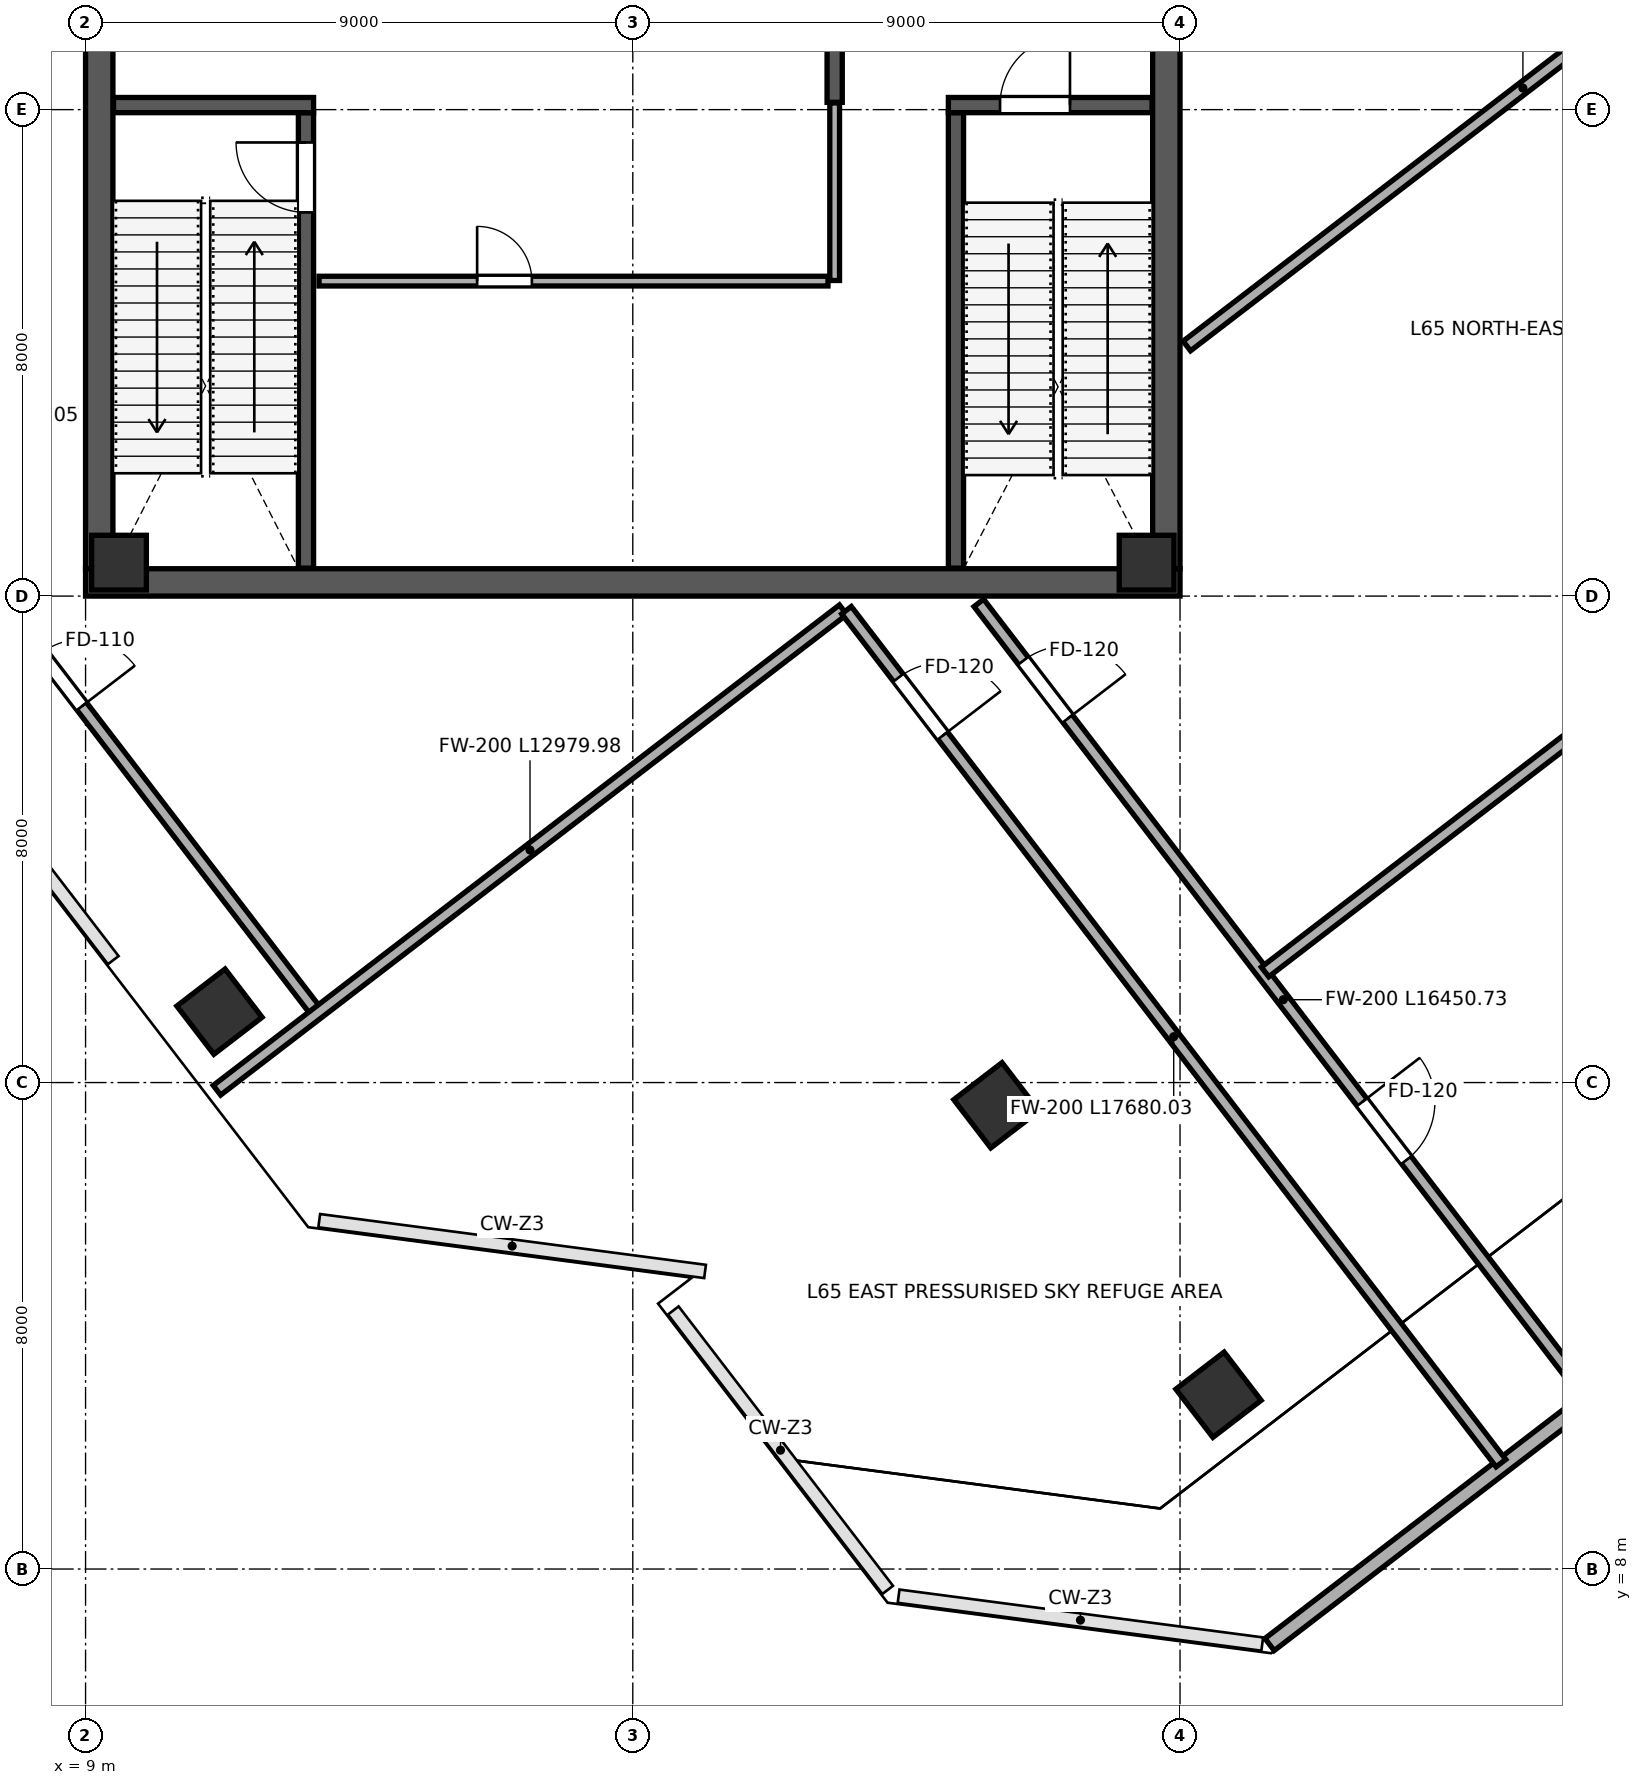
"""IFC4 building model, lengths in metres.
Left out: names, types, materials, properties, quantities, classifications, styles, units other than length and angle.
Written with IfcOpenShell. Run it as: python <this file> out.ifc"""

import sys

from ifc_helpers import new_model, si_unit, direction, frame, frame_2d, origin, origin_2d, place, context, subcontext, project, spatial, rectangle, extrude, clip, halfspace, source, transform, mapped, element, fill, save


model = new_model("IFC4")
c1 = context("Model", 3, precision=1e-05, world=origin(), true_north=direction((0.0, 1.0)))
c2 = subcontext(c1, "Body", "Model", "MODEL_VIEW")
j1 = project(units=[si_unit("LENGTHUNIT", "METRE"), si_unit("PLANEANGLEUNIT", "RADIAN")], contexts=[c1])
p1 = place(None, origin())
s1 = spatial("IfcSite", under=j1, at=p1, CompositionType="ELEMENT")
p2 = place(p1, origin())
s2 = spatial("IfcBuilding", under=s1, at=p2, CompositionType="ELEMENT")
p3 = place(p2, frame((0.0, 0.0, 287.8)))
s3 = spatial("IfcBuildingStorey", under=s2, at=p3, CompositionType="ELEMENT", Elevation=287.8)
m1 = source(origin(), c2, "Body", "SweptSolid", [
    extrude(rectangle(XDim=0.9, YDim=0.9, at=origin_2d()), origin(), (0.0, 0.0, 1.0), 5.999),
])
for number, where, z_axis, x_axis in (
    (1, (9.55, 24.55, 0.001), (0.0, 0.0, 1.0), (1.0, 0.0, 0.0)),
    (2, (26.45, 24.55, 0.001), (0.0, 0.0, 1.0), (1.0, 0.0, 0.0)),
):
    element("IfcColumn", number, at=place(p3, frame(where, z_axis=z_axis, x_axis=x_axis)), inside=s3, PredefinedType="COLUMN", context=c2, shape_type="MappedRepresentation", body=[
        mapped(m1, transform((0.0, 0.0, 0.0), scale=1.0)),
    ])
p4 = place(p3, frame((11.202, 17.166, 0.0), z_axis=(-0.105297550082, 0.076532357281, 0.991491414101), x_axis=(0.994201661281, 0.029964203351, 0.103272470792)))
e3 = element("IfcColumn", 3, at=p4, inside=s3, PredefinedType="COLUMN", context=c2, shape_type="Clipping", body=[
    clip(clip(extrude(rectangle(XDim=1.0, YDim=1.0, at=origin_2d()), origin(), (0.0, 0.0, 1.0), 6.052), halfspace(frame((0.0, 0.0, 0.093), z_axis=(0.0, 0.0, -1.0), x_axis=(1.0, 0.0, 0.0)), False)), halfspace(frame((0.0, 0.0, 5.959), z_axis=(0.0, 0.0, 1.0), x_axis=(1.0, 0.0, 0.0)), False)),
])
p5 = place(p3, frame((23.98, 15.626, 0.0), z_axis=(-0.118568909367, -0.015310942641, 0.99282777397), x_axis=(0.703214390485, 0.704622852055, 0.094848075236)))
e4 = element("IfcColumn", 4, at=p5, inside=s3, PredefinedType="COLUMN", context=c2, shape_type="Clipping", body=[
    clip(clip(extrude(rectangle(XDim=1.0, YDim=1.0, at=origin_2d()), origin(), (0.0, 0.0, 1.0), 6.043), halfspace(frame((0.0, 0.0, 0.085), z_axis=(0.0, 0.0, -1.0), x_axis=(1.0, 0.0, 0.0)), False)), halfspace(frame((0.0, 0.0, 5.958), z_axis=(0.0, 0.0, 1.0), x_axis=(1.0, 0.0, 0.0)), False)),
])
m2 = source(origin(), c2, "Body", "SweptSolid", [
    extrude(rectangle(XDim=1.0, YDim=1.0, at=origin_2d()), origin(), (0.0, 0.0, 1.0), 5.799),
])
p6 = place(p3, frame((27.633, 10.866, 0.001), z_axis=(0.0, 0.0, 1.0), x_axis=(-0.608761429009, 0.793353340291, 0.0)))
e5 = element("IfcColumn", 5, at=p6, inside=s3, PredefinedType="COLUMN", context=c2, shape_type="MappedRepresentation", body=[
    mapped(m2, transform((0.0, 0.0, 0.0), scale=1.0)),
])
p7 = place(p3, frame((28.473, 6.759, 0.0), z_axis=(0.0, 0.0, 1.0), x_axis=(0.793348027375, 0.608768352873, 0.0)))
e6 = element("IfcWall", 6, at=p7, inside=s3, PredefinedType="SOLIDWALL", context=c2, shape_type="SweptSolid", body=[
    extrude(rectangle(XDim=21.469, YDim=0.25, at=frame_2d((10.734, 0.0))), origin(), (0.0, 0.0, 1.0), 5.72),
])
p8 = place(p3, frame((9.225, 24.45, 0.0), z_axis=(0.0, 0.0, 1.0), x_axis=(0.0, 1.0, 0.0)))
e7 = element("IfcWall", 7, at=p8, inside=s3, PredefinedType="SHEAR", context=c2, shape_type="SweptSolid", body=[
    extrude(rectangle(XDim=15.1, YDim=0.45, at=frame_2d((7.55, 0.0))), origin(), (0.0, 0.0, 1.0), 5.72),
])
p9 = place(p8, frame((8.7, 0.0, 0.0)))
e8 = element("IfcOpeningElement", 8, at=p9, cuts=e7, PredefinedType="OPENING", context=c2, shape_type="SweptSolid", body=[
    extrude(rectangle(XDim=1.15, YDim=2.2, at=frame_2d((0.575, 1.1))), frame((0.0, 0.235, 0.0), z_axis=(0.0, -1.0, 0.0), x_axis=(1.0, 0.0, 0.0)), (0.0, 0.0, 1.0), 0.47),
])
p10 = place(p3, frame((26.775, 24.45, 0.0), z_axis=(0.0, 0.0, 1.0), x_axis=(0.0, 1.0, 0.0)))
e9 = element("IfcWall", 9, at=p10, inside=s3, PredefinedType="SHEAR", context=c2, shape_type="SweptSolid", body=[
    extrude(rectangle(XDim=15.1, YDim=0.45, at=frame_2d((7.55, 0.0))), origin(), (0.0, 0.0, 1.0), 5.72),
])
p11 = place(p10, frame((8.6, 0.0, 0.0)))
e10 = element("IfcOpeningElement", 10, at=p11, cuts=e9, PredefinedType="OPENING", context=c2, shape_type="SweptSolid", body=[
    extrude(rectangle(XDim=1.15, YDim=2.2, at=frame_2d((0.575, 1.1))), frame((0.0, 0.235, 0.0), z_axis=(0.0, -1.0, 0.0), x_axis=(1.0, 0.0, 0.0)), (0.0, 0.0, 1.0), 0.47),
])
p12 = place(p3, frame((9.0, 24.225, 0.0), z_axis=(0.0, 0.0, 1.0), x_axis=(1.0, 0.0, 0.0)))
e11 = element("IfcWall", 11, at=p12, inside=s3, PredefinedType="SHEAR", context=c2, shape_type="SweptSolid", body=[
    extrude(rectangle(XDim=18.0, YDim=0.45, at=frame_2d((9.0, 0.0))), origin(), (0.0, 0.0, 1.0), 5.72),
])
p13 = place(p3, frame((12.625, 24.46, 0.0), z_axis=(0.0, 0.0, 1.0), x_axis=(0.0, 1.0, 0.0)))
e12 = element("IfcWall", 12, at=p13, inside=s3, PredefinedType="SHEAR", context=c2, shape_type="SweptSolid", body=[
    extrude(rectangle(XDim=7.49, YDim=0.25, at=frame_2d((3.745, 0.0))), origin(), (0.0, 0.0, 1.0), 5.72),
])
p14 = place(p13, frame((5.85, 0.0, 0.0)))
e13 = element("IfcOpeningElement", 13, at=p14, cuts=e12, PredefinedType="OPENING", context=c2, shape_type="SweptSolid", body=[
    extrude(rectangle(XDim=1.15, YDim=2.2, at=frame_2d((0.575, 1.1))), frame((0.0, 0.135, 0.0), z_axis=(0.0, -1.0, 0.0), x_axis=(1.0, 0.0, 0.0)), (0.0, 0.0, 1.0), 0.27),
])
p15 = place(p3, frame((9.46, 32.075, 0.0), z_axis=(0.0, 0.0, 1.0), x_axis=(1.0, 0.0, 0.0)))
e14 = element("IfcWall", 14, at=p15, inside=s3, PredefinedType="SHEAR", context=c2, shape_type="SweptSolid", body=[
    extrude(rectangle(XDim=3.29, YDim=0.25, at=frame_2d((1.645, 0.0))), origin(), (0.0, 0.0, 1.0), 5.72),
])
p16 = place(p3, frame((23.315, 24.46, 0.0), z_axis=(0.0, 0.0, 1.0), x_axis=(0.0, 1.0, 0.0)))
e15 = element("IfcWall", 15, at=p16, inside=s3, PredefinedType="SHEAR", context=c2, shape_type="SweptSolid", body=[
    extrude(rectangle(XDim=7.49, YDim=0.25, at=frame_2d((3.745, 0.0))), origin(), (0.0, 0.0, 1.0), 5.72),
])
p17 = place(p3, frame((23.19, 32.075, 0.0), z_axis=(0.0, 0.0, 1.0), x_axis=(1.0, 0.0, 0.0)))
e16 = element("IfcWall", 16, at=p17, inside=s3, PredefinedType="SHEAR", context=c2, shape_type="SweptSolid", body=[
    extrude(rectangle(XDim=3.35, YDim=0.25, at=frame_2d((1.675, 0.0))), origin(), (0.0, 0.0, 1.0), 5.72),
])
p18 = place(p17, frame((0.85, 0.0, 0.0)))
e17 = element("IfcOpeningElement", 17, at=p18, cuts=e16, PredefinedType="OPENING", context=c2, shape_type="SweptSolid", body=[
    extrude(rectangle(XDim=1.15, YDim=2.2, at=frame_2d((0.575, 1.1))), frame((0.0, 0.135, 0.0), z_axis=(0.0, -1.0, 0.0), x_axis=(1.0, 0.0, 0.0)), (0.0, 0.0, 1.0), 0.27),
])
p19 = place(p3, frame((21.32, 32.12, 0.0), z_axis=(0.0, 0.0, 1.0), x_axis=(0.0, 1.0, 0.0)))
e18 = element("IfcWall", 18, at=p19, inside=s3, PredefinedType="SHEAR", context=c2, shape_type="SweptSolid", body=[
    extrude(rectangle(XDim=7.42, YDim=0.25, at=frame_2d((3.71, 0.0))), origin(), (0.0, 0.0, 1.0), 5.72),
])
p20 = place(p19, frame((1.4, 0.0, 0.0)))
e19 = element("IfcOpeningElement", 19, at=p20, cuts=e18, PredefinedType="OPENING", context=c2, shape_type="SweptSolid", body=[
    extrude(rectangle(XDim=1.15, YDim=2.2, at=frame_2d((0.575, 1.1))), frame((0.0, 0.135, 0.0), z_axis=(0.0, -1.0, 0.0), x_axis=(1.0, 0.0, 0.0)), (0.0, 0.0, 1.0), 0.27),
])
p21 = place(p3, frame((12.84, 29.18, 0.0), z_axis=(0.0, 0.0, 1.0), x_axis=(1.0, 0.0, 0.0)))
e20 = element("IfcWall", 20, at=p21, inside=s3, PredefinedType="PARTITIONING", context=c2, shape_type="SweptSolid", body=[
    extrude(rectangle(XDim=8.37, YDim=0.16, at=frame_2d((4.185, 0.0))), origin(), (0.0, 0.0, 1.0), 5.72),
])
p22 = place(p21, frame((2.6, 0.0, 0.0)))
e21 = element("IfcOpeningElement", 21, at=p22, cuts=e20, PredefinedType="OPENING", context=c2, shape_type="SweptSolid", body=[
    extrude(rectangle(XDim=0.9, YDim=2.15, at=frame_2d((0.45, 1.075))), frame((0.0, 0.09, 0.0), z_axis=(0.0, -1.0, 0.0), x_axis=(1.0, 0.0, 0.0)), (0.0, 0.0, 1.0), 0.18),
])
p23 = place(p3, frame((21.32, 29.19, 0.0), z_axis=(0.0, 0.0, 1.0), x_axis=(0.0, 1.0, 0.0)))
e22 = element("IfcWall", 22, at=p23, inside=s3, PredefinedType="PARTITIONING", context=c2, shape_type="SweptSolid", body=[
    extrude(rectangle(XDim=2.92, YDim=0.16, at=frame_2d((1.46, 0.0))), origin(), (0.0, 0.0, 1.0), 5.72),
])
p24 = place(p3, frame((-0.413, 34.373, 0.0), z_axis=(0.0, 0.0, 1.0), x_axis=(0.608759126262, -0.793355107246, 0.0)))
e23 = element("IfcWall", 23, at=p24, inside=s3, PredefinedType="SOLIDWALL", context=c2, shape_type="SweptSolid", body=[
    extrude(rectangle(XDim=21.682, YDim=0.2, at=frame_2d((10.841, 0.0))), origin(), (0.0, 0.0, 1.0), 5.72),
])
p25 = place(p24, frame((14.26, 0.0, 0.0)))
e24 = element("IfcOpeningElement", 24, at=p25, cuts=e23, PredefinedType="OPENING", context=c2, shape_type="SweptSolid", body=[
    extrude(rectangle(XDim=1.1, YDim=2.2, at=frame_2d((0.55, 1.1))), frame((0.0, 0.11, 0.0), z_axis=(0.0, -1.0, 0.0), x_axis=(1.0, 0.0, 0.0)), (0.0, 0.0, 1.0), 0.22),
])
p26 = place(p3, frame((11.161, 15.873, 0.0), z_axis=(0.0, 0.0, 1.0), x_axis=(0.793361083019, 0.608751338357, 0.0)))
e25 = element("IfcWall", 25, at=p26, inside=s3, PredefinedType="SOLIDWALL", context=c2, shape_type="SweptSolid", body=[
    extrude(rectangle(XDim=12.98, YDim=0.2, at=frame_2d((6.49, 0.0))), origin(), (0.0, 0.0, 1.0), 5.72),
])
p27 = place(p3, frame((21.515, 23.768, 0.0), z_axis=(0.0, 0.0, 1.0), x_axis=(0.608757342993, -0.793356475584, 0.0)))
e26 = element("IfcWall", 26, at=p27, inside=s3, PredefinedType="SOLIDWALL", context=c2, shape_type="SweptSolid", body=[
    extrude(rectangle(XDim=17.68, YDim=0.2, at=frame_2d((8.84, 0.0))), origin(), (0.0, 0.0, 1.0), 5.72),
])
p28 = place(p27, frame((1.4, 0.0, 0.0)))
e27 = element("IfcOpeningElement", 27, at=p28, cuts=e26, PredefinedType="OPENING", context=c2, shape_type="SweptSolid", body=[
    extrude(rectangle(XDim=1.2, YDim=2.2, at=frame_2d((0.6, 1.1))), frame((0.0, 0.11, 0.0), z_axis=(0.0, -1.0, 0.0), x_axis=(1.0, 0.0, 0.0)), (0.0, 0.0, 1.0), 0.22),
])
p29 = place(p3, frame((27.112, 28.113, 0.0), z_axis=(0.0, 0.0, 1.0), x_axis=(0.793358129931, 0.608755186977, 0.0)))
e28 = element("IfcWall", 28, at=p29, inside=s3, PredefinedType="SOLIDWALL", context=c2, shape_type="SweptSolid", body=[
    extrude(rectangle(XDim=13.934, YDim=0.2, at=frame_2d((6.967, 0.0))), origin(), (0.0, 0.0, 1.0), 4.955),
])
p30 = place(p3, frame((23.691, 23.888, 0.0), z_axis=(0.0, 0.0, 1.0), x_axis=(0.608754272677, -0.793358831487, 0.0)))
e29 = element("IfcWall", 29, at=p30, inside=s3, PredefinedType="SOLIDWALL", context=c2, shape_type="SweptSolid", body=[
    extrude(rectangle(XDim=16.451, YDim=0.2, at=frame_2d((8.225, 0.0))), origin(), (0.0, 0.0, 1.0), 5.72),
])
p31 = place(p30, frame((1.2, 0.0, 0.0)))
e30 = element("IfcOpeningElement", 30, at=p31, cuts=e29, PredefinedType="OPENING", context=c2, shape_type="SweptSolid", body=[
    extrude(rectangle(XDim=1.2, YDim=2.2, at=frame_2d((0.6, 1.1))), frame((0.0, 0.11, 0.0), z_axis=(0.0, -1.0, 0.0), x_axis=(1.0, 0.0, 0.0)), (0.0, 0.0, 1.0), 0.22),
])
p32 = place(p30, frame((10.35, 0.0, 0.0)))
e31 = element("IfcOpeningElement", 31, at=p32, cuts=e29, PredefinedType="OPENING", context=c2, shape_type="SweptSolid", body=[
    extrude(rectangle(XDim=1.2, YDim=2.2, at=frame_2d((0.6, 1.1))), frame((0.0, 0.11, 0.0), z_axis=(0.0, -1.0, 0.0), x_axis=(1.0, 0.0, 0.0)), (0.0, 0.0, 1.0), 0.22),
])
p33 = place(p3, frame((28.398, 17.819, 0.0), z_axis=(0.0, 0.0, 1.0), x_axis=(0.793359220406, 0.608753765818, 0.0)))
e32 = element("IfcWall", 32, at=p33, inside=s3, PredefinedType="SOLIDWALL", context=c2, shape_type="SweptSolid", body=[
    extrude(rectangle(XDim=19.18, YDim=0.2, at=frame_2d((9.59, 0.0))), origin(), (0.0, 0.0, 1.0), 5.068),
])
m3 = source(origin(), c2, "Body", "SweptSolid", [
    extrude(rectangle(XDim=1.15, YDim=2.2, at=frame_2d((0.575, 1.1))), frame((0.0, 0.025, 0.0), z_axis=(0.0, -1.0, 0.0), x_axis=(1.0, 0.0, 0.0)), (0.0, 0.0, 1.0), 0.05),
])
p34 = place(p14, origin())
e33 = element("IfcDoor", 33, at=p34, inside=s3, OperationType="SINGLE_SWING_RIGHT", PredefinedType="DOOR", context=c2, shape_type="MappedRepresentation", body=[
    mapped(m3, transform((0.0, 0.0, 0.0), scale=1.0)),
])
fill(e13, e33)
p35 = place(p18, origin())
e34 = element("IfcDoor", 34, at=p35, inside=s3, OperationType="SINGLE_SWING_RIGHT", PredefinedType="DOOR", context=c2, shape_type="MappedRepresentation", body=[
    mapped(m3, transform((0.0, 0.0, 0.0), scale=1.0)),
])
fill(e17, e34)
m4 = source(origin(), c2, "Body", "SweptSolid", [
    extrude(rectangle(XDim=0.9, YDim=2.15, at=frame_2d((0.45, 1.075))), frame((0.0, 0.025, 0.0), z_axis=(0.0, -1.0, 0.0), x_axis=(1.0, 0.0, 0.0)), (0.0, 0.0, 1.0), 0.05),
])
p36 = place(p22, origin())
e35 = element("IfcDoor", 35, at=p36, inside=s3, OperationType="SINGLE_SWING_LEFT", PredefinedType="DOOR", context=c2, shape_type="MappedRepresentation", body=[
    mapped(m4, transform((0.0, 0.0, 0.0), scale=1.0)),
])
fill(e21, e35)
m5 = source(origin(), c2, "Body", "SweptSolid", [
    extrude(rectangle(XDim=1.1, YDim=2.2, at=frame_2d((0.55, 1.1))), frame((0.0, 0.025, 0.0), z_axis=(0.0, -1.0, 0.0), x_axis=(1.0, 0.0, 0.0)), (0.0, 0.0, 1.0), 0.05),
])
p37 = place(p25, origin())
e36 = element("IfcDoor", 36, at=p37, inside=s3, OperationType="SINGLE_SWING_RIGHT", PredefinedType="DOOR", context=c2, shape_type="MappedRepresentation", body=[
    mapped(m5, transform((0.0, 0.0, 0.0), scale=1.0)),
])
fill(e24, e36)
m6 = source(origin(), c2, "Body", "SweptSolid", [
    extrude(rectangle(XDim=1.2, YDim=2.2, at=frame_2d((0.6, 1.1))), frame((0.0, 0.025, 0.0), z_axis=(0.0, -1.0, 0.0), x_axis=(1.0, 0.0, 0.0)), (0.0, 0.0, 1.0), 0.05),
])
p38 = place(p28, origin())
e37 = element("IfcDoor", 37, at=p38, inside=s3, OperationType="SINGLE_SWING_RIGHT", PredefinedType="DOOR", context=c2, shape_type="MappedRepresentation", body=[
    mapped(m6, transform((0.0, 0.0, 0.0), scale=1.0)),
])
fill(e27, e37)
p39 = place(p31, origin())
e38 = element("IfcDoor", 38, at=p39, inside=s3, OperationType="SINGLE_SWING_RIGHT", PredefinedType="DOOR", context=c2, shape_type="MappedRepresentation", body=[
    mapped(m6, transform((0.0, 0.0, 0.0), scale=1.0)),
])
fill(e30, e38)
p40 = place(p32, origin())
e39 = element("IfcDoor", 39, at=p40, inside=s3, OperationType="SINGLE_SWING_LEFT", PredefinedType="DOOR", context=c2, shape_type="MappedRepresentation", body=[
    mapped(m6, transform((0.0, 0.0, 0.0), scale=1.0)),
])
fill(e31, e39)
save(model, sys.argv[1])
